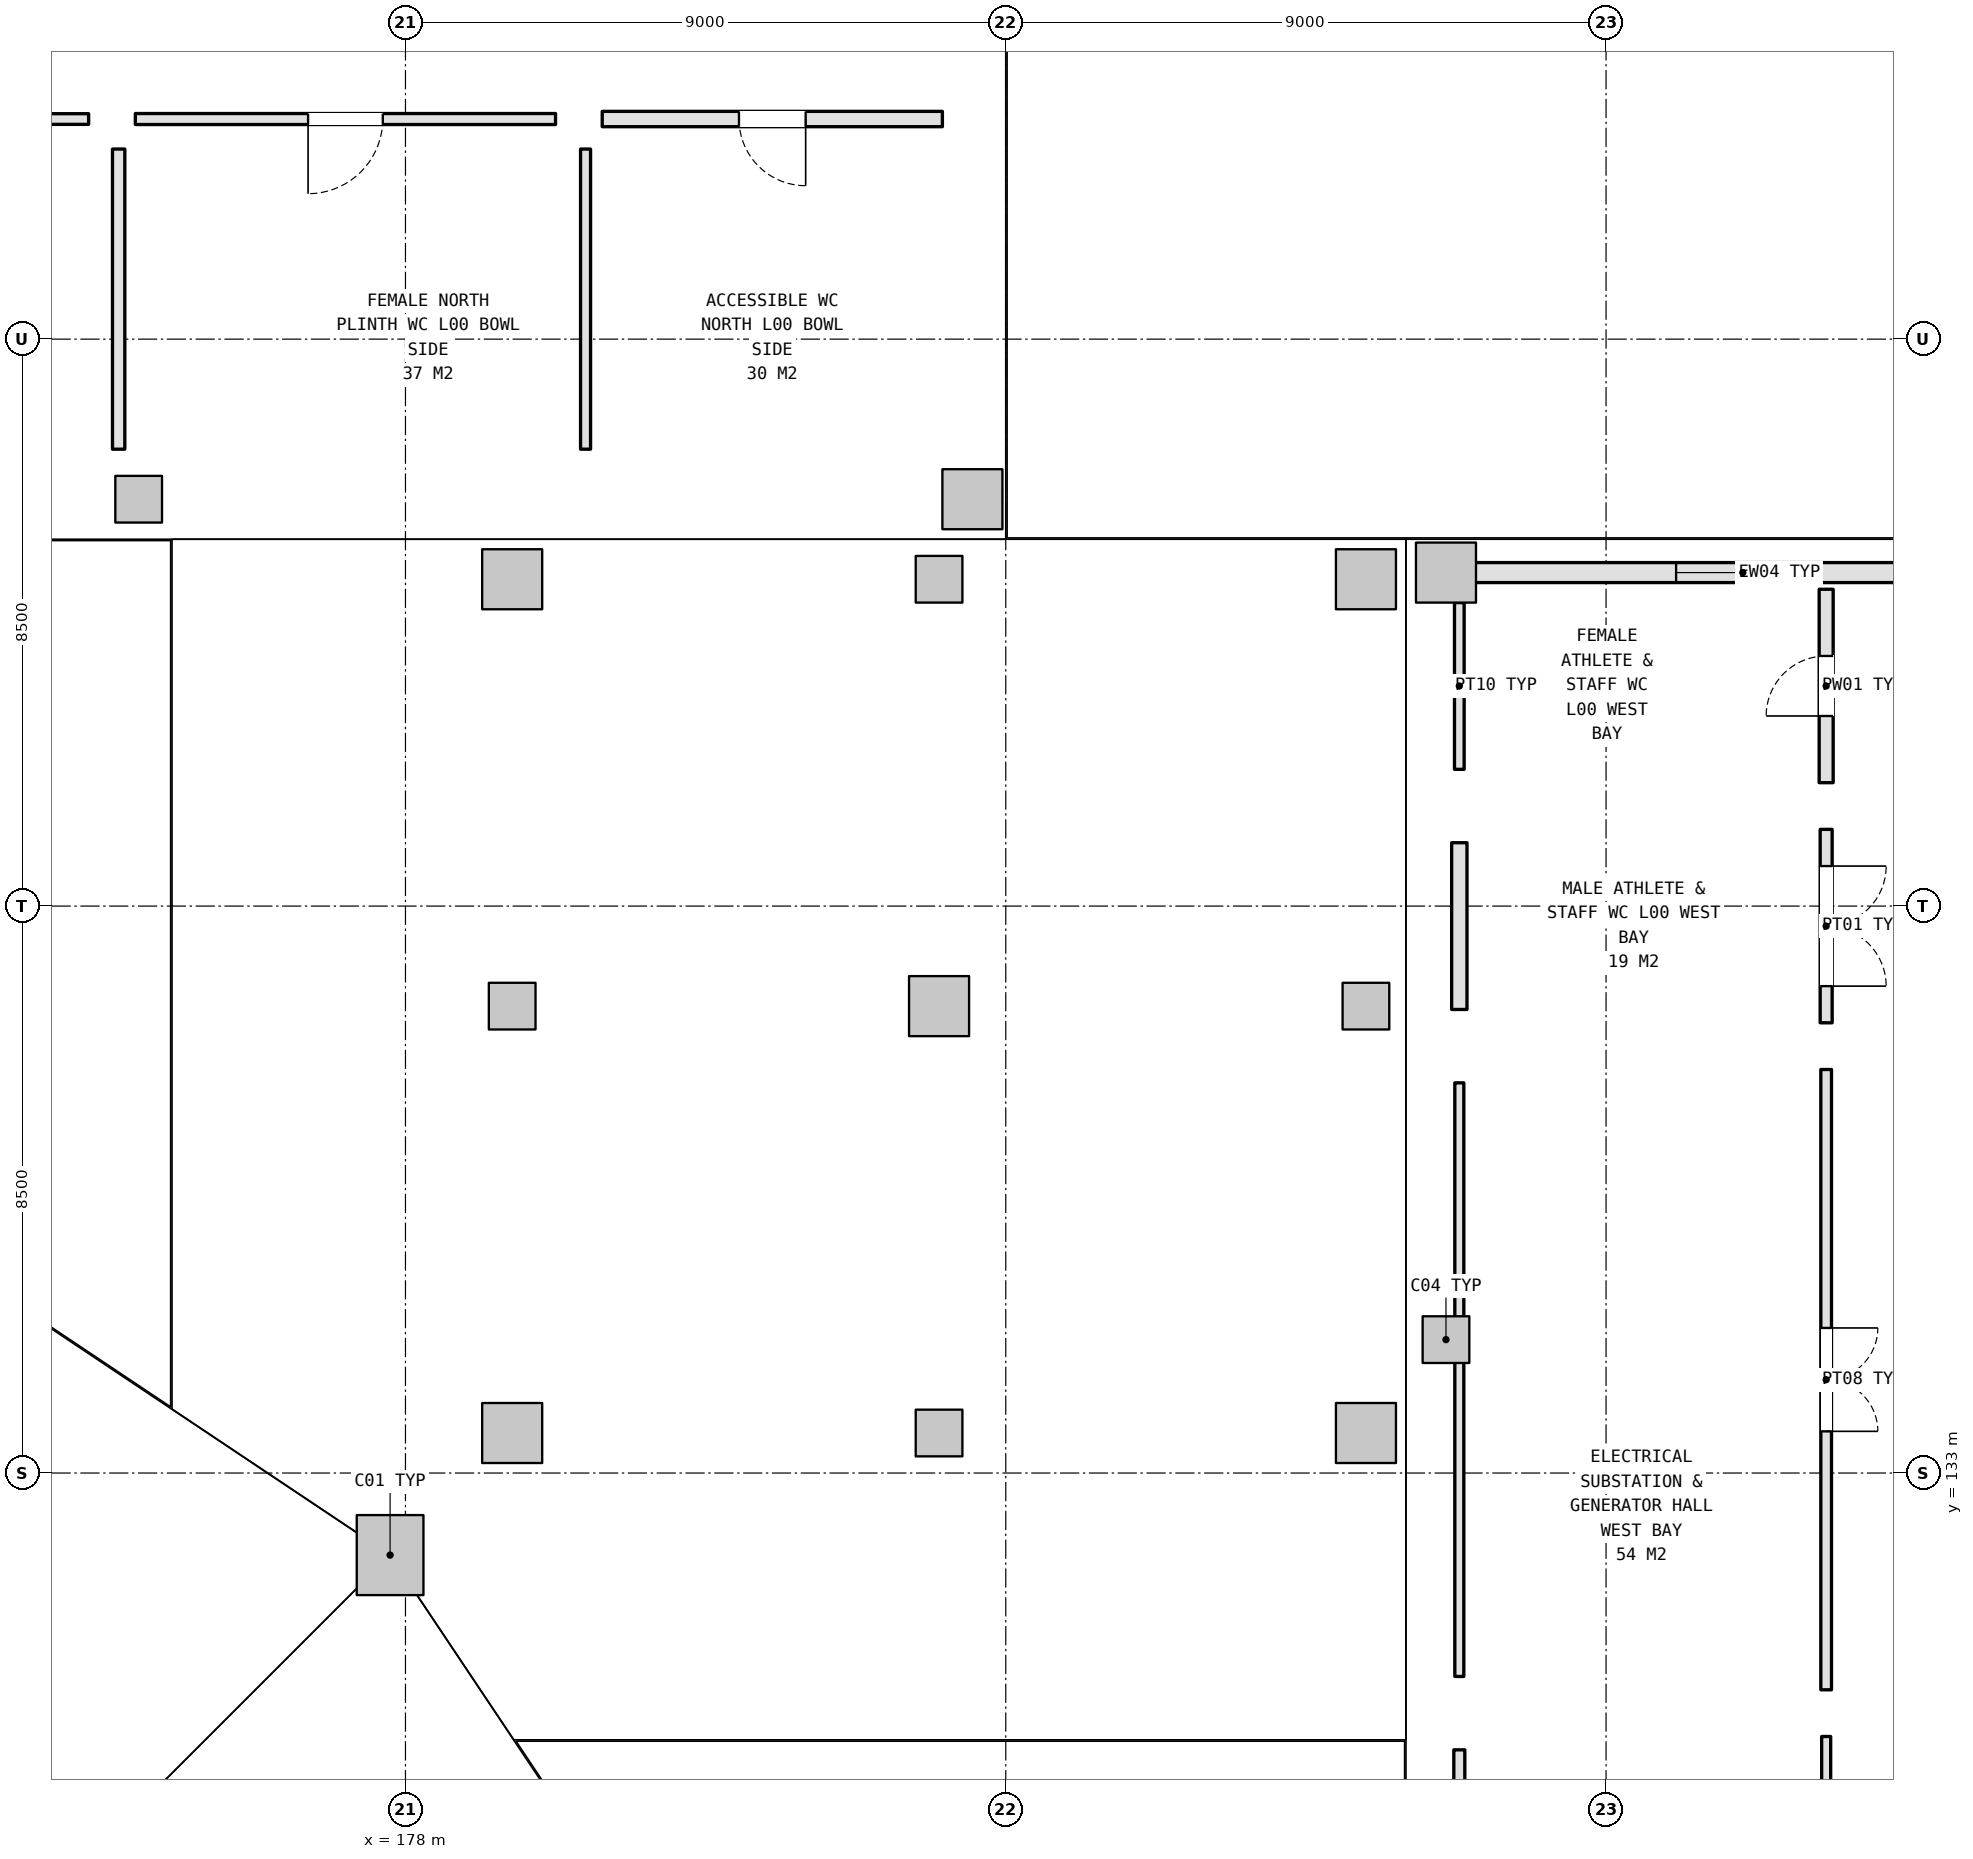
"""IFC4 building model, lengths in metres.
Left out: names, types, materials, properties, quantities, classifications, styles, units other than length and angle.
Written with IfcOpenShell. Run it as: python <this file> out.ifc"""

import sys

from ifc_helpers import new_model, si_unit, direction, frame, frame_2d, origin, origin_2d, place, context, subcontext, project, spatial, rectangle, extrude, element, fill, save


model = new_model("IFC4")
c1 = context("Model", 3, precision=1e-05, world=origin(), true_north=direction((0.0, 1.0)))
c2 = subcontext(c1, "Body", "Model", "MODEL_VIEW")
j1 = project(units=[si_unit("LENGTHUNIT", "METRE"), si_unit("PLANEANGLEUNIT", "RADIAN")], contexts=[c1])
p1 = place(None, origin())
s1 = spatial("IfcSite", under=j1, at=p1, CompositionType="ELEMENT")
p2 = place(p1, origin())
s2 = spatial("IfcBuilding", under=s1, at=p2, CompositionType="ELEMENT")
p3 = place(p2, origin())
s3 = spatial("IfcBuildingStorey", under=s2, at=p3, CompositionType="ELEMENT", Elevation=0.0)
p4 = place(p3, frame((177.77, 131.77, 0.0), z_axis=(0.0, 0.0, 1.0), x_axis=(1.0, 0.0, 0.0)))
e1 = element("IfcColumn", 1, at=p4, inside=s3, PredefinedType="COLUMN", context=c2, shape_type="SweptSolid", body=[
    extrude(rectangle(XDim=1.0, YDim=1.2, at=origin_2d()), origin(), (0.0, 0.0, 1.0), 5.4),
])
p5 = place(p3, frame((193.6, 135.0, 0.0), z_axis=(0.0, 0.0, 1.0), x_axis=(1.0, 0.0, 0.0)))
e2 = element("IfcColumn", 2, at=p5, inside=s3, PredefinedType="COLUMN", context=c2, shape_type="SweptSolid", body=[
    extrude(rectangle(XDim=0.7, YDim=0.7, at=origin_2d()), origin(), (0.0, 0.0, 1.0), 5.4),
])
p6 = place(p3, frame((193.6, 146.5, 0.0), z_axis=(0.0, 0.0, 1.0), x_axis=(1.0, 0.0, 0.0)))
e3 = element("IfcColumn", 3, at=p6, inside=s3, PredefinedType="COLUMN", context=c2, shape_type="SweptSolid", body=[
    extrude(rectangle(XDim=0.9, YDim=0.9, at=origin_2d()), origin(), (0.0, 0.0, 1.0), 5.4),
])
p7 = place(p3, frame((174.0, 147.6, 0.0), z_axis=(0.0, 0.0, 1.0), x_axis=(1.0, 0.0, 0.0)))
e4 = element("IfcColumn", 4, at=p7, inside=s3, PredefinedType="COLUMN", context=c2, shape_type="SweptSolid", body=[
    extrude(rectangle(XDim=0.7, YDim=0.7, at=origin_2d()), origin(), (0.0, 0.0, 1.0), 5.4),
])
for number, where, z_axis, x_axis in (
    (5, (186.5, 147.6, 0.0), (0.0, 0.0, 1.0), (1.0, 0.0, 0.0)),
    (6, (179.6, 133.6, 0.0), (0.0, 0.0, 1.0), (1.0, 0.0, 0.0)),
):
    element("IfcColumn", number, at=place(p3, frame(where, z_axis=z_axis, x_axis=x_axis)), inside=s3, PredefinedType="COLUMN", context=c2, shape_type="SweptSolid", body=[
        extrude(rectangle(XDim=0.9, YDim=0.9, at=origin_2d()), origin(), (0.0, 0.0, 1.0), 5.4),
    ])
p8 = place(p3, frame((179.6, 140.0, 0.0), z_axis=(0.0, 0.0, 1.0), x_axis=(1.0, 0.0, 0.0)))
e7 = element("IfcColumn", 7, at=p8, inside=s3, PredefinedType="COLUMN", context=c2, shape_type="SweptSolid", body=[
    extrude(rectangle(XDim=0.7, YDim=0.7, at=origin_2d()), origin(), (0.0, 0.0, 1.0), 5.4),
])
p9 = place(p3, frame((179.6, 146.4, 0.0), z_axis=(0.0, 0.0, 1.0), x_axis=(1.0, 0.0, 0.0)))
e8 = element("IfcColumn", 8, at=p9, inside=s3, PredefinedType="COLUMN", context=c2, shape_type="SweptSolid", body=[
    extrude(rectangle(XDim=0.9, YDim=0.9, at=origin_2d()), origin(), (0.0, 0.0, 1.0), 5.4),
])
p10 = place(p3, frame((186.0, 133.6, 0.0), z_axis=(0.0, 0.0, 1.0), x_axis=(1.0, 0.0, 0.0)))
e9 = element("IfcColumn", 9, at=p10, inside=s3, PredefinedType="COLUMN", context=c2, shape_type="SweptSolid", body=[
    extrude(rectangle(XDim=0.7, YDim=0.7, at=origin_2d()), origin(), (0.0, 0.0, 1.0), 5.4),
])
p11 = place(p3, frame((186.0, 140.0, 0.0), z_axis=(0.0, 0.0, 1.0), x_axis=(1.0, 0.0, 0.0)))
e10 = element("IfcColumn", 10, at=p11, inside=s3, PredefinedType="COLUMN", context=c2, shape_type="SweptSolid", body=[
    extrude(rectangle(XDim=0.9, YDim=0.9, at=origin_2d()), origin(), (0.0, 0.0, 1.0), 5.4),
])
p12 = place(p3, frame((186.0, 146.4, 0.0), z_axis=(0.0, 0.0, 1.0), x_axis=(1.0, 0.0, 0.0)))
e11 = element("IfcColumn", 11, at=p12, inside=s3, PredefinedType="COLUMN", context=c2, shape_type="SweptSolid", body=[
    extrude(rectangle(XDim=0.7, YDim=0.7, at=origin_2d()), origin(), (0.0, 0.0, 1.0), 5.4),
])
p13 = place(p3, frame((192.4, 133.6, 0.0), z_axis=(0.0, 0.0, 1.0), x_axis=(1.0, 0.0, 0.0)))
e12 = element("IfcColumn", 12, at=p13, inside=s3, PredefinedType="COLUMN", context=c2, shape_type="SweptSolid", body=[
    extrude(rectangle(XDim=0.9, YDim=0.9, at=origin_2d()), origin(), (0.0, 0.0, 1.0), 5.4),
])
p14 = place(p3, frame((192.4, 140.0, 0.0), z_axis=(0.0, 0.0, 1.0), x_axis=(1.0, 0.0, 0.0)))
e13 = element("IfcColumn", 13, at=p14, inside=s3, PredefinedType="COLUMN", context=c2, shape_type="SweptSolid", body=[
    extrude(rectangle(XDim=0.7, YDim=0.7, at=origin_2d()), origin(), (0.0, 0.0, 1.0), 5.4),
])
p15 = place(p3, frame((192.4, 146.4, 0.0), z_axis=(0.0, 0.0, 1.0), x_axis=(1.0, 0.0, 0.0)))
e14 = element("IfcColumn", 14, at=p15, inside=s3, PredefinedType="COLUMN", context=c2, shape_type="SweptSolid", body=[
    extrude(rectangle(XDim=0.9, YDim=0.9, at=origin_2d()), origin(), (0.0, 0.0, 1.0), 5.4),
])
p16 = place(p3, frame((194.038, 146.5, 0.0), z_axis=(0.0, 0.0, 1.0), x_axis=(1.0, 0.0, 0.0)))
e15 = element("IfcWall", 15, at=p16, inside=s3, PredefinedType="SOLIDWALL", context=c2, shape_type="SweptSolid", body=[
    extrude(rectangle(XDim=8.024, YDim=0.3, at=frame_2d((4.012, 0.0))), origin(), (0.0, 0.0, 1.0), 4.715),
])
p17 = place(p16, frame((3.012, 0.0, 1.05)))
e16 = element("IfcOpeningElement", 16, at=p17, cuts=e15, PredefinedType="OPENING", context=c2, shape_type="SweptSolid", body=[
    extrude(rectangle(XDim=2.0, YDim=1.7, at=frame_2d((1.0, 0.85))), frame((0.0, 0.16, 0.0), z_axis=(0.0, -1.0, 0.0), x_axis=(1.0, 0.0, 0.0)), (0.0, 0.0, 1.0), 0.32),
])
p18 = place(p3, frame((199.3, 129.05, 0.0), z_axis=(0.0, 0.0, 1.0), x_axis=(0.0, -1.0, 0.0)))
e17 = element("IfcWall", 17, at=p18, inside=s3, PredefinedType="PARTITIONING", context=c2, shape_type="SweptSolid", body=[
    extrude(rectangle(XDim=11.3, YDim=0.135, at=frame_2d((5.65, 0.0))), origin(), (0.0, 0.0, 1.0), 4.625),
])
p19 = place(p18, frame((4.8, 0.0, 0.0)))
e18 = element("IfcOpeningElement", 18, at=p19, cuts=e17, PredefinedType="OPENING", context=c2, shape_type="SweptSolid", body=[
    extrude(rectangle(XDim=1.7, YDim=2.25, at=frame_2d((0.85, 1.125))), frame((0.0, 0.077, 0.0), z_axis=(0.0, -1.0, 0.0), x_axis=(1.0, 0.0, 0.0)), (0.0, 0.0, 1.0), 0.155),
])
p20 = place(p3, frame((193.8, 117.95, 0.0), z_axis=(0.0, 0.0, 1.0), x_axis=(0.0, 1.0, 0.0)))
e19 = element("IfcWall", 19, at=p20, inside=s3, PredefinedType="PARTITIONING", context=c2, shape_type="SweptSolid", body=[
    extrude(rectangle(XDim=10.9, YDim=0.165, at=frame_2d((5.45, 0.0))), origin(), (0.0, 0.0, 1.0), 4.475),
])
p21 = place(p3, frame((199.3, 139.05, 0.0), z_axis=(0.0, 0.0, 1.0), x_axis=(0.0, -1.0, 0.0)))
e20 = element("IfcWall", 20, at=p21, inside=s3, PredefinedType="PARTITIONING", context=c2, shape_type="SweptSolid", body=[
    extrude(rectangle(XDim=9.3, YDim=0.16, at=frame_2d((4.65, 0.0))), origin(), (0.0, 0.0, 1.0), 4.715),
])
p22 = place(p21, frame((3.875, 0.0, 0.0)))
e21 = element("IfcOpeningElement", 21, at=p22, cuts=e20, PredefinedType="OPENING", context=c2, shape_type="SweptSolid", body=[
    extrude(rectangle(XDim=1.55, YDim=2.15, at=frame_2d((0.775, 1.075))), frame((0.0, 0.09, 0.0), z_axis=(0.0, -1.0, 0.0), x_axis=(1.0, 0.0, 0.0)), (0.0, 0.0, 1.0), 0.18),
])
p23 = place(p3, frame((193.8, 129.95, 0.0), z_axis=(0.0, 0.0, 1.0), x_axis=(0.0, 1.0, 0.0)))
e22 = element("IfcWall", 22, at=p23, inside=s3, PredefinedType="PARTITIONING", context=c2, shape_type="SweptSolid", body=[
    extrude(rectangle(XDim=8.9, YDim=0.135, at=frame_2d((4.45, 0.0))), origin(), (0.0, 0.0, 1.0), 4.475),
])
p24 = place(p3, frame((199.3, 142.65, 0.0), z_axis=(0.0, 0.0, 1.0), x_axis=(0.0, -1.0, 0.0)))
e23 = element("IfcWall", 23, at=p24, inside=s3, PredefinedType="PARTITIONING", context=c2, shape_type="SweptSolid", body=[
    extrude(rectangle(XDim=2.9, YDim=0.18, at=frame_2d((1.45, 0.0))), origin(), (0.0, 0.0, 1.0), 4.625),
])
p25 = place(p24, frame((0.55, 0.0, 0.0)))
e24 = element("IfcOpeningElement", 24, at=p25, cuts=e23, PredefinedType="OPENING", context=c2, shape_type="SweptSolid", body=[
    extrude(rectangle(XDim=1.8, YDim=2.2, at=frame_2d((0.9, 1.1))), frame((0.0, 0.1, 0.0), z_axis=(0.0, -1.0, 0.0), x_axis=(1.0, 0.0, 0.0)), (0.0, 0.0, 1.0), 0.2),
])
p26 = place(p3, frame((193.8, 139.95, 0.0), z_axis=(0.0, 0.0, 1.0), x_axis=(0.0, 1.0, 0.0)))
e25 = element("IfcWall", 25, at=p26, inside=s3, PredefinedType="PLUMBINGWALL", context=c2, shape_type="SweptSolid", body=[
    extrude(rectangle(XDim=2.5, YDim=0.23, at=frame_2d((1.25, 0.0))), origin(), (0.0, 0.0, 1.0), 4.475),
])
p27 = place(p3, frame((199.3, 146.25, 0.0), z_axis=(0.0, 0.0, 1.0), x_axis=(0.0, -1.0, 0.0)))
e26 = element("IfcWall", 26, at=p27, inside=s3, PredefinedType="PLUMBINGWALL", context=c2, shape_type="SweptSolid", body=[
    extrude(rectangle(XDim=2.9, YDim=0.21, at=frame_2d((1.45, 0.0))), origin(), (0.0, 0.0, 1.0), 4.715),
])
p28 = place(p27, frame((1.0, 0.0, 0.0)))
e27 = element("IfcOpeningElement", 27, at=p28, cuts=e26, PredefinedType="OPENING", context=c2, shape_type="SweptSolid", body=[
    extrude(rectangle(XDim=0.9, YDim=2.1, at=frame_2d((0.45, 1.05))), frame((0.0, 0.115, 0.0), z_axis=(0.0, -1.0, 0.0), x_axis=(1.0, 0.0, 0.0)), (0.0, 0.0, 1.0), 0.23),
])
p29 = place(p3, frame((193.8, 143.55, 0.0), z_axis=(0.0, 0.0, 1.0), x_axis=(0.0, 1.0, 0.0)))
e28 = element("IfcWall", 28, at=p29, inside=s3, PredefinedType="PARTITIONING", context=c2, shape_type="SweptSolid", body=[
    extrude(rectangle(XDim=2.5, YDim=0.145, at=frame_2d((1.25, 0.0))), origin(), (0.0, 0.0, 1.0), 4.475),
])
p30 = place(p3, frame((166.95, 153.3, 0.0), z_axis=(0.0, 0.0, 1.0), x_axis=(1.0, 0.0, 0.0)))
e29 = element("IfcWall", 29, at=p30, inside=s3, PredefinedType="PARTITIONING", context=c2, shape_type="SweptSolid", body=[
    extrude(rectangle(XDim=6.3, YDim=0.16, at=frame_2d((3.15, 0.0))), origin(), (0.0, 0.0, 1.0), 5.12),
])
p31 = place(p30, frame((2.66, 0.0, 0.0)))
e30 = element("IfcOpeningElement", 30, at=p31, cuts=e29, PredefinedType="OPENING", context=c2, shape_type="SweptSolid", body=[
    extrude(rectangle(XDim=0.98, YDim=2.15, at=frame_2d((0.49, 1.075))), frame((0.0, 0.09, 0.0), z_axis=(0.0, -1.0, 0.0), x_axis=(1.0, 0.0, 0.0)), (0.0, 0.0, 1.0), 0.18),
])
p32 = place(p3, frame((173.95, 153.3, 0.0), z_axis=(0.0, 0.0, 1.0), x_axis=(1.0, 0.0, 0.0)))
e31 = element("IfcWall", 31, at=p32, inside=s3, PredefinedType="PARTITIONING", context=c2, shape_type="SweptSolid", body=[
    extrude(rectangle(XDim=6.3, YDim=0.165, at=frame_2d((3.15, 0.0))), origin(), (0.0, 0.0, 1.0), 4.525),
])
p33 = place(p32, frame((2.59, 0.0, 0.0)))
e32 = element("IfcOpeningElement", 32, at=p33, cuts=e31, PredefinedType="OPENING", context=c2, shape_type="SweptSolid", body=[
    extrude(rectangle(XDim=1.12, YDim=2.2, at=frame_2d((0.56, 1.1))), frame((0.0, 0.093, 0.0), z_axis=(0.0, -1.0, 0.0), x_axis=(1.0, 0.0, 0.0)), (0.0, 0.0, 1.0), 0.185),
])
p34 = place(p3, frame((173.7, 148.35, 0.0), z_axis=(0.0, 0.0, 1.0), x_axis=(0.0, 1.0, 0.0)))
e33 = element("IfcWall", 33, at=p34, inside=s3, PredefinedType="PARTITIONING", context=c2, shape_type="SweptSolid", body=[
    extrude(rectangle(XDim=4.5, YDim=0.185, at=frame_2d((2.25, 0.0))), origin(), (0.0, 0.0, 1.0), 4.525),
])
p35 = place(p3, frame((180.95, 153.3, 0.0), z_axis=(0.0, 0.0, 1.0), x_axis=(1.0, 0.0, 0.0)))
e34 = element("IfcWall", 34, at=p35, inside=s3, PredefinedType="PLUMBINGWALL", context=c2, shape_type="SweptSolid", body=[
    extrude(rectangle(XDim=5.1, YDim=0.23, at=frame_2d((2.55, 0.0))), origin(), (0.0, 0.0, 1.0), 5.12),
])
p36 = place(p35, frame((2.05, 0.0, 0.0)))
e35 = element("IfcOpeningElement", 35, at=p36, cuts=e34, PredefinedType="OPENING", context=c2, shape_type="SweptSolid", body=[
    extrude(rectangle(XDim=1.0, YDim=2.1, at=frame_2d((0.5, 1.05))), frame((0.0, 0.125, 0.0), z_axis=(0.0, -1.0, 0.0), x_axis=(1.0, 0.0, 0.0)), (0.0, 0.0, 1.0), 0.25),
])
p37 = place(p3, frame((180.7, 148.35, 0.0), z_axis=(0.0, 0.0, 1.0), x_axis=(0.0, 1.0, 0.0)))
e36 = element("IfcWall", 36, at=p37, inside=s3, PredefinedType="PARTITIONING", context=c2, shape_type="SweptSolid", body=[
    extrude(rectangle(XDim=4.5, YDim=0.15, at=frame_2d((2.25, 0.0))), origin(), (0.0, 0.0, 1.0), 4.675),
])
p38 = place(p17, origin())
e37 = element("IfcWindow", 37, at=p38, inside=s3, PartitioningType="SINGLE_PANEL", PredefinedType="WINDOW", context=c2, shape_type="SweptSolid", body=[
    extrude(rectangle(XDim=2.0, YDim=1.7, at=frame_2d((1.0, 0.85))), frame((0.0, 0.03, 0.0), z_axis=(0.0, -1.0, 0.0), x_axis=(1.0, 0.0, 0.0)), (0.0, 0.0, 1.0), 0.06),
])
fill(e16, e37)
p39 = place(p22, origin())
e38 = element("IfcDoor", 38, at=p39, inside=s3, OperationType="DOUBLE_DOOR_SINGLE_SWING", PredefinedType="DOOR", context=c2, shape_type="SweptSolid", body=[
    extrude(rectangle(XDim=1.55, YDim=2.15, at=frame_2d((0.775, 1.075))), frame((0.0, 0.025, 0.0), z_axis=(0.0, -1.0, 0.0), x_axis=(1.0, 0.0, 0.0)), (0.0, 0.0, 1.0), 0.05),
])
fill(e21, e38)
p40 = place(p25, origin())
e39 = element("IfcDoor", 39, at=p40, inside=s3, OperationType="DOUBLE_DOOR_SINGLE_SWING", PredefinedType="DOOR", context=c2, shape_type="SweptSolid", body=[
    extrude(rectangle(XDim=1.8, YDim=2.2, at=frame_2d((0.9, 1.1))), frame((0.0, 0.025, 0.0), z_axis=(0.0, -1.0, 0.0), x_axis=(1.0, 0.0, 0.0)), (0.0, 0.0, 1.0), 0.05),
])
fill(e24, e39)
p41 = place(p28, frame((0.9, 0.0, 0.0), z_axis=(0.0, 0.0, 1.0), x_axis=(-1.0, 0.0, 0.0)))
e40 = element("IfcDoor", 40, at=p41, inside=s3, OperationType="SINGLE_SWING_RIGHT", PredefinedType="DOOR", context=c2, shape_type="SweptSolid", body=[
    extrude(rectangle(XDim=0.9, YDim=2.1, at=frame_2d((0.45, 1.05))), frame((0.0, 0.025, 0.0), z_axis=(0.0, -1.0, 0.0), x_axis=(1.0, 0.0, 0.0)), (0.0, 0.0, 1.0), 0.05),
])
fill(e27, e40)
p42 = place(p33, frame((1.12, 0.0, 0.0), z_axis=(0.0, 0.0, 1.0), x_axis=(-1.0, 0.0, 0.0)))
e41 = element("IfcDoor", 41, at=p42, inside=s3, OperationType="SINGLE_SWING_LEFT", PredefinedType="DOOR", context=c2, shape_type="SweptSolid", body=[
    extrude(rectangle(XDim=1.12, YDim=2.2, at=frame_2d((0.56, 1.1))), frame((0.0, 0.025, 0.0), z_axis=(0.0, -1.0, 0.0), x_axis=(1.0, 0.0, 0.0)), (0.0, 0.0, 1.0), 0.05),
])
fill(e32, e41)
p43 = place(p36, frame((1.0, 0.0, 0.0), z_axis=(0.0, 0.0, 1.0), x_axis=(-1.0, 0.0, 0.0)))
e42 = element("IfcDoor", 42, at=p43, inside=s3, OperationType="SINGLE_SWING_RIGHT", PredefinedType="DOOR", context=c2, shape_type="SweptSolid", body=[
    extrude(rectangle(XDim=1.0, YDim=2.1, at=frame_2d((0.5, 1.05))), frame((0.0, 0.025, 0.0), z_axis=(0.0, -1.0, 0.0), x_axis=(1.0, 0.0, 0.0)), (0.0, 0.0, 1.0), 0.05),
])
fill(e35, e42)
save(model, sys.argv[1])
